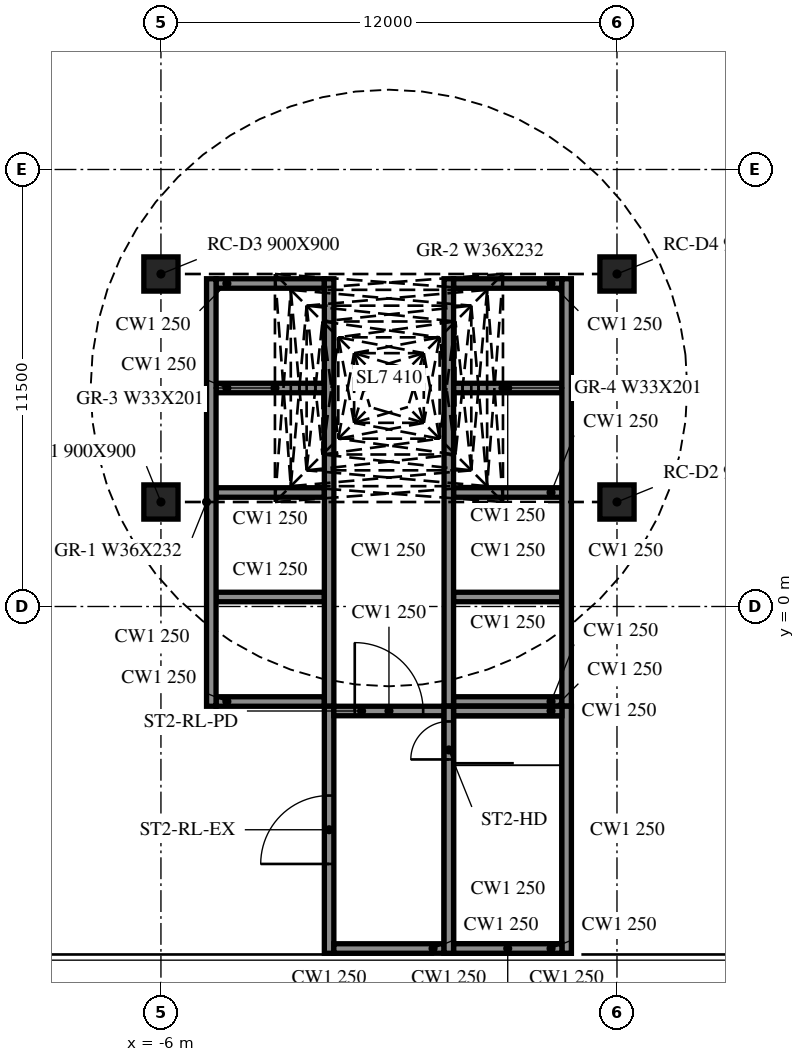
"""IFC4 building model, lengths in metres.
Left out: names, types, materials, properties, quantities, classifications, styles, units other than length and angle.
Written with IfcOpenShell. Run it as: python <this file> out.ifc"""

import sys

from ifc_helpers import new_model, si_unit, direction, frame, frame_2d, origin, origin_2d, place, context, subcontext, project, spatial, rectangle, extrude, element, fill, save


model = new_model("IFC4")
c1 = context("Model", 3, precision=1e-05, world=origin(), true_north=direction((0.0, 1.0)))
c2 = subcontext(c1, "Body", "Model", "MODEL_VIEW")
j1 = project(units=[si_unit("LENGTHUNIT", "METRE"), si_unit("PLANEANGLEUNIT", "RADIAN")], contexts=[c1])
p1 = place(None, origin())
s1 = spatial("IfcSite", under=j1, at=p1, CompositionType="ELEMENT")
p2 = place(p1, origin())
s2 = spatial("IfcBuilding", under=s1, at=p2, CompositionType="ELEMENT")
p3 = place(p2, frame((0.0, 0.0, 289.7)))
s3 = spatial("IfcBuildingStorey", under=s2, at=p3, CompositionType="ELEMENT", Elevation=289.7)
for number, where, z_axis, x_axis in (
    (1, (-6.0, 2.75, 0.01), (0.0, 0.0, 1.0), (1.0, 0.0, 0.0)),
    (2, (6.0, 2.75, 0.01), (0.0, 0.0, 1.0), (1.0, 0.0, 0.0)),
    (3, (-6.0, 8.75, 0.01), (0.0, 0.0, 1.0), (1.0, 0.0, 0.0)),
    (4, (6.0, 8.75, 0.01), (0.0, 0.0, 1.0), (1.0, 0.0, 0.0)),
):
    element("IfcColumn", number, at=place(p3, frame(where, z_axis=z_axis, x_axis=x_axis)), inside=s3, PredefinedType="COLUMN", context=c2, shape_type="SweptSolid", body=[
        extrude(rectangle(XDim=0.9, YDim=0.9, at=origin_2d()), origin(), (0.0, 0.0, 1.0), 2.948),
    ])
for number, where, z_axis, x_axis in (
    (5, (-4.675, -2.625, -3.6), (0.0, 0.0, 1.0), (0.0, 1.0, 0.0)),
    (6, (-1.575, -2.625, -3.6), (0.0, 0.0, 1.0), (0.0, 1.0, 0.0)),
):
    element("IfcWall", number, at=place(p3, frame(where, z_axis=z_axis, x_axis=x_axis)), inside=s3, PredefinedType="SOLIDWALL", context=c2, shape_type="SweptSolid", body=[
        extrude(rectangle(XDim=11.25, YDim=0.25, at=frame_2d((5.625, 0.0))), origin(), (0.0, 0.0, 1.0), 3.2),
    ])
for number, where, z_axis, x_axis in (
    (7, (-4.55, -2.5, -3.6), (0.0, 0.0, 1.0), (1.0, 0.0, 0.0)),
    (8, (-4.55, 0.25, -3.6), (0.0, 0.0, 1.0), (1.0, 0.0, 0.0)),
    (9, (-4.55, 3.0, -3.6), (0.0, 0.0, 1.0), (1.0, 0.0, 0.0)),
    (10, (-4.55, 5.75, -3.6), (0.0, 0.0, 1.0), (1.0, 0.0, 0.0)),
    (11, (-4.55, 8.5, -3.6), (0.0, 0.0, 1.0), (1.0, 0.0, 0.0)),
):
    element("IfcWall", number, at=place(p3, frame(where, z_axis=z_axis, x_axis=x_axis)), inside=s3, PredefinedType="SOLIDWALL", context=c2, shape_type="SweptSolid", body=[
        extrude(rectangle(XDim=2.85, YDim=0.25, at=frame_2d((1.425, 0.0))), origin(), (0.0, 0.0, 1.0), 3.2),
    ])
for number, where, z_axis, x_axis in (
    (12, (4.675, -2.625, -3.6), (0.0, 0.0, 1.0), (0.0, 1.0, 0.0)),
    (13, (1.575, -2.625, -3.6), (0.0, 0.0, 1.0), (0.0, 1.0, 0.0)),
):
    element("IfcWall", number, at=place(p3, frame(where, z_axis=z_axis, x_axis=x_axis)), inside=s3, PredefinedType="SOLIDWALL", context=c2, shape_type="SweptSolid", body=[
        extrude(rectangle(XDim=11.25, YDim=0.25, at=frame_2d((5.625, 0.0))), origin(), (0.0, 0.0, 1.0), 3.2),
    ])
for number, where, z_axis, x_axis in (
    (14, (1.7, -2.5, -3.6), (0.0, 0.0, 1.0), (1.0, 0.0, 0.0)),
    (15, (1.7, 0.25, -3.6), (0.0, 0.0, 1.0), (1.0, 0.0, 0.0)),
    (16, (1.7, 3.0, -3.6), (0.0, 0.0, 1.0), (1.0, 0.0, 0.0)),
    (17, (1.7, 5.75, -3.6), (0.0, 0.0, 1.0), (1.0, 0.0, 0.0)),
    (18, (1.7, 8.5, -3.6), (0.0, 0.0, 1.0), (1.0, 0.0, 0.0)),
):
    element("IfcWall", number, at=place(p3, frame(where, z_axis=z_axis, x_axis=x_axis)), inside=s3, PredefinedType="SOLIDWALL", context=c2, shape_type="SweptSolid", body=[
        extrude(rectangle(XDim=2.85, YDim=0.25, at=frame_2d((1.425, 0.0))), origin(), (0.0, 0.0, 1.0), 3.2),
    ])
for number, where, z_axis, x_axis in (
    (19, (1.575, -9.125, -3.6), (0.0, 0.0, 1.0), (0.0, 1.0, 0.0)),
    (20, (4.675, -9.125, -3.6), (0.0, 0.0, 1.0), (0.0, 1.0, 0.0)),
):
    element("IfcWall", number, at=place(p3, frame(where, z_axis=z_axis, x_axis=x_axis)), inside=s3, PredefinedType="SOLIDWALL", context=c2, shape_type="SweptSolid", body=[
        extrude(rectangle(XDim=6.5, YDim=0.25, at=frame_2d((3.25, 0.0))), origin(), (0.0, 0.0, 1.0), 3.2),
    ])
for number, where, z_axis, x_axis in (
    (21, (1.7, -9.0, -3.6), (0.0, 0.0, 1.0), (1.0, 0.0, 0.0)),
    (22, (1.7, -2.75, -3.6), (0.0, 0.0, 1.0), (1.0, 0.0, 0.0)),
):
    element("IfcWall", number, at=place(p3, frame(where, z_axis=z_axis, x_axis=x_axis)), inside=s3, PredefinedType="SOLIDWALL", context=c2, shape_type="SweptSolid", body=[
        extrude(rectangle(XDim=2.85, YDim=0.25, at=frame_2d((1.425, 0.0))), origin(), (0.0, 0.0, 1.0), 3.2),
    ])
p4 = place(p3, frame((1.575, -9.125, 0.0), z_axis=(0.0, 0.0, 1.0), x_axis=(0.0, 1.0, 0.0)))
e23 = element("IfcWall", 23, at=p4, inside=s3, PredefinedType="SOLIDWALL", context=c2, shape_type="SweptSolid", body=[
    extrude(rectangle(XDim=6.5, YDim=0.25, at=frame_2d((3.25, 0.0))), origin(), (0.0, 0.0, 1.0), 3.0),
])
p5 = place(p4, frame((5.1, 0.0, 0.0)))
e24 = element("IfcOpeningElement", 24, at=p5, cuts=e23, PredefinedType="OPENING", context=c2, shape_type="SweptSolid", body=[
    extrude(rectangle(XDim=1.0, YDim=2.1, at=frame_2d((0.5, 1.05))), frame((0.0, 0.135, 0.0), z_axis=(0.0, -1.0, 0.0), x_axis=(1.0, 0.0, 0.0)), (0.0, 0.0, 1.0), 0.27),
])
p6 = place(p3, frame((4.675, -9.125, 0.0), z_axis=(0.0, 0.0, 1.0), x_axis=(0.0, 1.0, 0.0)))
e25 = element("IfcWall", 25, at=p6, inside=s3, PredefinedType="SOLIDWALL", context=c2, shape_type="SweptSolid", body=[
    extrude(rectangle(XDim=6.5, YDim=0.25, at=frame_2d((3.25, 0.0))), origin(), (0.0, 0.0, 1.0), 3.0),
])
for number, where, z_axis, x_axis in (
    (26, (1.7, -9.0, 0.0), (0.0, 0.0, 1.0), (1.0, 0.0, 0.0)),
    (27, (1.7, -2.75, 0.0), (0.0, 0.0, 1.0), (1.0, 0.0, 0.0)),
):
    element("IfcWall", number, at=place(p3, frame(where, z_axis=z_axis, x_axis=x_axis)), inside=s3, PredefinedType="SOLIDWALL", context=c2, shape_type="SweptSolid", body=[
        extrude(rectangle(XDim=2.85, YDim=0.25, at=frame_2d((1.425, 0.0))), origin(), (0.0, 0.0, 1.0), 3.0),
    ])
p7 = place(p3, frame((-1.575, -9.125, 0.0), z_axis=(0.0, 0.0, 1.0), x_axis=(0.0, 1.0, 0.0)))
e28 = element("IfcWall", 28, at=p7, inside=s3, PredefinedType="SOLIDWALL", context=c2, shape_type="SweptSolid", body=[
    extrude(rectangle(XDim=6.5, YDim=0.25, at=frame_2d((3.25, 0.0))), origin(), (0.0, 0.0, 1.0), 3.0),
])
p8 = place(p7, frame((2.35, 0.0, 0.0)))
e29 = element("IfcOpeningElement", 29, at=p8, cuts=e28, PredefinedType="OPENING", context=c2, shape_type="SweptSolid", body=[
    extrude(rectangle(XDim=1.8, YDim=2.1, at=frame_2d((0.9, 1.05))), frame((0.0, 0.135, 0.0), z_axis=(0.0, -1.0, 0.0), x_axis=(1.0, 0.0, 0.0)), (0.0, 0.0, 1.0), 0.27),
])
p9 = place(p3, frame((-1.45, -9.0, 0.0), z_axis=(0.0, 0.0, 1.0), x_axis=(1.0, 0.0, 0.0)))
e30 = element("IfcWall", 30, at=p9, inside=s3, PredefinedType="SOLIDWALL", context=c2, shape_type="SweptSolid", body=[
    extrude(rectangle(XDim=2.9, YDim=0.25, at=frame_2d((1.45, 0.0))), origin(), (0.0, 0.0, 1.0), 3.0),
])
p10 = place(p3, frame((-1.45, -2.75, 0.0), z_axis=(0.0, 0.0, 1.0), x_axis=(1.0, 0.0, 0.0)))
e31 = element("IfcWall", 31, at=p10, inside=s3, PredefinedType="SOLIDWALL", context=c2, shape_type="SweptSolid", body=[
    extrude(rectangle(XDim=2.9, YDim=0.25, at=frame_2d((1.45, 0.0))), origin(), (0.0, 0.0, 1.0), 3.0),
])
p11 = place(p10, frame((0.55, 0.0, 0.0)))
e32 = element("IfcOpeningElement", 32, at=p11, cuts=e31, PredefinedType="OPENING", context=c2, shape_type="SweptSolid", body=[
    extrude(rectangle(XDim=1.8, YDim=2.1, at=frame_2d((0.9, 1.05))), frame((0.0, 0.135, 0.0), z_axis=(0.0, -1.0, 0.0), x_axis=(1.0, 0.0, 0.0)), (0.0, 0.0, 1.0), 0.27),
])
p12 = place(p5, origin())
e33 = element("IfcDoor", 33, at=p12, inside=s3, OperationType="SINGLE_SWING_LEFT", PredefinedType="DOOR", context=c2, shape_type="SweptSolid", body=[
    extrude(rectangle(XDim=1.0, YDim=2.1, at=frame_2d((0.5, 1.05))), frame((0.0, 0.025, 0.0), z_axis=(0.0, -1.0, 0.0), x_axis=(1.0, 0.0, 0.0)), (0.0, 0.0, 1.0), 0.05),
])
fill(e24, e33)
p13 = place(p8, origin())
e34 = element("IfcDoor", 34, at=p13, inside=s3, OperationType="DOUBLE_DOOR_SINGLE_SWING", PredefinedType="DOOR", context=c2, shape_type="SweptSolid", body=[
    extrude(rectangle(XDim=1.8, YDim=2.1, at=frame_2d((0.9, 1.05))), frame((0.0, 0.025, 0.0), z_axis=(0.0, -1.0, 0.0), x_axis=(1.0, 0.0, 0.0)), (0.0, 0.0, 1.0), 0.05),
])
fill(e29, e34)
p14 = place(p11, origin())
e35 = element("IfcDoor", 35, at=p14, inside=s3, OperationType="DOUBLE_DOOR_SINGLE_SWING", PredefinedType="DOOR", context=c2, shape_type="SweptSolid", body=[
    extrude(rectangle(XDim=1.8, YDim=2.1, at=frame_2d((0.9, 1.05))), frame((0.0, 0.025, 0.0), z_axis=(0.0, -1.0, 0.0), x_axis=(1.0, 0.0, 0.0)), (0.0, 0.0, 1.0), 0.05),
])
fill(e32, e35)
save(model, sys.argv[1])
